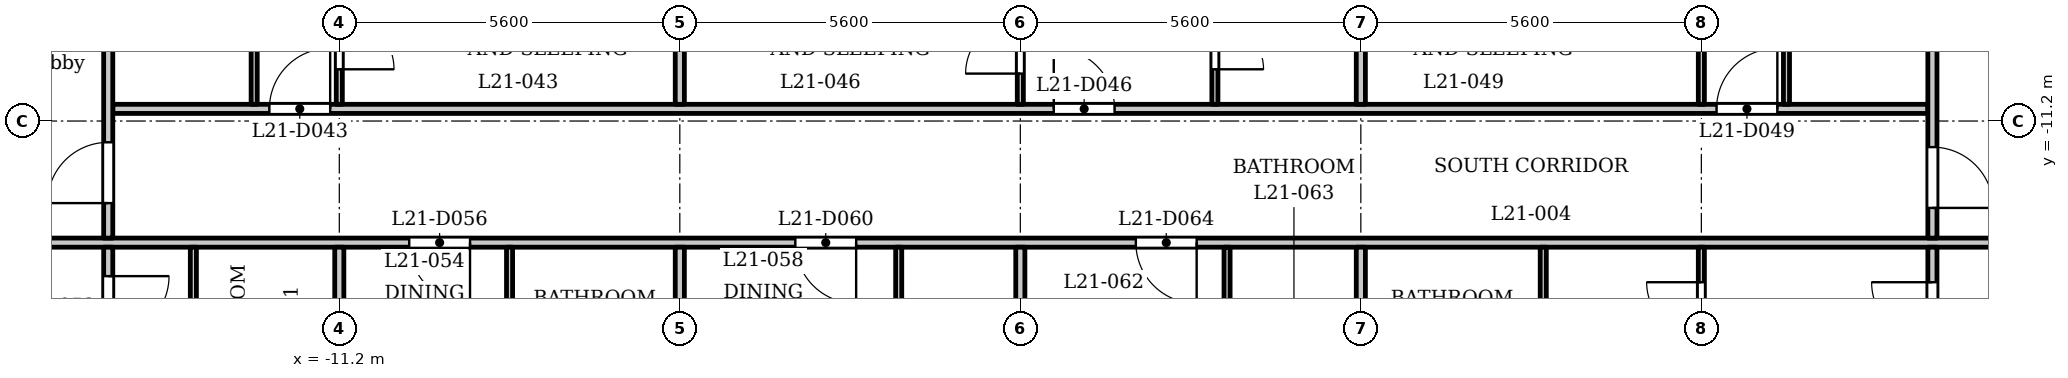
"""IFC4 building model, lengths in metres.
Left out: names, types, materials, properties, quantities, classifications, styles, units other than length and angle.
Written with IfcOpenShell. Run it as: python <this file> out.ifc"""

import sys

from ifc_helpers import new_model, si_unit, direction, frame, frame_2d, origin, place, context, subcontext, project, spatial, rectangle, extrude, element, fill, save


model = new_model("IFC4")
c1 = context("Model", 3, precision=1e-05, world=origin(), true_north=direction((0.0, 1.0)))
c2 = subcontext(c1, "Body", "Model", "MODEL_VIEW")
j1 = project(units=[si_unit("LENGTHUNIT", "METRE"), si_unit("PLANEANGLEUNIT", "RADIAN")], contexts=[c1])
p1 = place(None, origin())
s1 = spatial("IfcSite", under=j1, at=p1, CompositionType="ELEMENT")
p2 = place(p1, origin())
s2 = spatial("IfcBuilding", under=s1, at=p2, CompositionType="ELEMENT")
p3 = place(p2, frame((0.0, 0.0, 86.8)))
s3 = spatial("IfcBuildingStorey", under=s2, at=p3, CompositionType="ELEMENT", Elevation=86.8)
p4 = place(p3, frame((-17.4, -13.2, 0.0), z_axis=(0.0, 0.0, 1.0), x_axis=(1.0, 0.0, 0.0)))
e1 = element("IfcWall", 1, at=p4, inside=s3, PredefinedType="PARTITIONING", context=c2, shape_type="SweptSolid", body=[
    extrude(rectangle(XDim=34.8, YDim=0.15, at=frame_2d((17.4, 0.0))), origin(), (0.0, 0.0, 1.0), 3.2),
])
p5 = place(p4, frame((0.15, 0.0, 0.0)))
e2 = element("IfcOpeningElement", 2, at=p5, cuts=e1, PredefinedType="OPENING", context=c2, shape_type="SweptSolid", body=[
    extrude(rectangle(XDim=1.0, YDim=2.1, at=frame_2d((0.5, 1.05))), frame((0.0, 0.085, 0.0), z_axis=(0.0, -1.0, 0.0), x_axis=(1.0, 0.0, 0.0)), (0.0, 0.0, 1.0), 0.17),
])
p6 = place(p4, frame((33.55, 0.0, 0.0)))
e3 = element("IfcOpeningElement", 3, at=p6, cuts=e1, PredefinedType="OPENING", context=c2, shape_type="SweptSolid", body=[
    extrude(rectangle(XDim=1.0, YDim=2.1, at=frame_2d((0.5, 1.05))), frame((0.0, 0.085, 0.0), z_axis=(0.0, -1.0, 0.0), x_axis=(1.0, 0.0, 0.0)), (0.0, 0.0, 1.0), 0.17),
])
p7 = place(p4, frame((7.35, 0.0, 0.0)))
e4 = element("IfcOpeningElement", 4, at=p7, cuts=e1, PredefinedType="OPENING", context=c2, shape_type="SweptSolid", body=[
    extrude(rectangle(XDim=1.0, YDim=2.1, at=frame_2d((0.5, 1.05))), frame((0.0, 0.085, 0.0), z_axis=(0.0, -1.0, 0.0), x_axis=(1.0, 0.0, 0.0)), (0.0, 0.0, 1.0), 0.17),
])
p8 = place(p4, frame((13.7, 0.0, 0.0)))
e5 = element("IfcOpeningElement", 5, at=p8, cuts=e1, PredefinedType="OPENING", context=c2, shape_type="SweptSolid", body=[
    extrude(rectangle(XDim=1.0, YDim=2.1, at=frame_2d((0.5, 1.05))), frame((0.0, 0.085, 0.0), z_axis=(0.0, -1.0, 0.0), x_axis=(1.0, 0.0, 0.0)), (0.0, 0.0, 1.0), 0.17),
])
p9 = place(p4, frame((19.3, 0.0, 0.0)))
e6 = element("IfcOpeningElement", 6, at=p9, cuts=e1, PredefinedType="OPENING", context=c2, shape_type="SweptSolid", body=[
    extrude(rectangle(XDim=1.0, YDim=2.1, at=frame_2d((0.5, 1.05))), frame((0.0, 0.085, 0.0), z_axis=(0.0, -1.0, 0.0), x_axis=(1.0, 0.0, 0.0)), (0.0, 0.0, 1.0), 0.17),
])
p10 = place(p3, frame((-14.925, -11.0, 0.0), z_axis=(0.0, 0.0, 1.0), x_axis=(1.0, 0.0, 0.0)))
e7 = element("IfcWall", 7, at=p10, inside=s3, PredefinedType="PARTITIONING", context=c2, shape_type="SweptSolid", body=[
    extrude(rectangle(XDim=29.85, YDim=0.15, at=frame_2d((14.925, 0.0))), origin(), (0.0, 0.0, 1.0), 3.2),
])
p11 = place(p10, frame((2.575, 0.0, 0.0)))
e8 = element("IfcOpeningElement", 8, at=p11, cuts=e7, PredefinedType="OPENING", context=c2, shape_type="SweptSolid", body=[
    extrude(rectangle(XDim=1.0, YDim=2.1, at=frame_2d((0.5, 1.05))), frame((0.0, 0.085, 0.0), z_axis=(0.0, -1.0, 0.0), x_axis=(1.0, 0.0, 0.0)), (0.0, 0.0, 1.0), 0.17),
])
p12 = place(p10, frame((15.475, 0.0, 0.0)))
e9 = element("IfcOpeningElement", 9, at=p12, cuts=e7, PredefinedType="OPENING", context=c2, shape_type="SweptSolid", body=[
    extrude(rectangle(XDim=1.0, YDim=2.1, at=frame_2d((0.5, 1.05))), frame((0.0, 0.085, 0.0), z_axis=(0.0, -1.0, 0.0), x_axis=(1.0, 0.0, 0.0)), (0.0, 0.0, 1.0), 0.17),
])
p13 = place(p10, frame((26.375, 0.0, 0.0)))
e10 = element("IfcOpeningElement", 10, at=p13, cuts=e7, PredefinedType="OPENING", context=c2, shape_type="SweptSolid", body=[
    extrude(rectangle(XDim=1.0, YDim=2.1, at=frame_2d((0.5, 1.05))), frame((0.0, 0.085, 0.0), z_axis=(0.0, -1.0, 0.0), x_axis=(1.0, 0.0, 0.0)), (0.0, 0.0, 1.0), 0.17),
])
p14 = place(p3, frame((-15.0, -15.325, 0.0), z_axis=(0.0, 0.0, 1.0), x_axis=(0.0, 1.0, 0.0)))
e11 = element("IfcWall", 11, at=p14, inside=s3, PredefinedType="PARTITIONING", context=c2, shape_type="SweptSolid", body=[
    extrude(rectangle(XDim=2.05, YDim=0.15, at=frame_2d((1.025, 0.0))), origin(), (0.0, 0.0, 1.0), 3.2),
])
p15 = place(p14, frame((0.574, 0.0, 0.0)))
e12 = element("IfcOpeningElement", 12, at=p15, cuts=e11, PredefinedType="OPENING", context=c2, shape_type="SweptSolid", body=[
    extrude(rectangle(XDim=1.0, YDim=2.1, at=frame_2d((0.5, 1.05))), frame((0.0, 0.085, 0.0), z_axis=(0.0, -1.0, 0.0), x_axis=(1.0, 0.0, 0.0)), (0.0, 0.0, 1.0), 0.17),
])
p16 = place(p3, frame((-15.0, -13.125, 0.0), z_axis=(0.0, 0.0, 1.0), x_axis=(0.0, 1.0, 0.0)))
e13 = element("IfcWall", 13, at=p16, inside=s3, PredefinedType="PARTITIONING", context=c2, shape_type="SweptSolid", body=[
    extrude(rectangle(XDim=6.356, YDim=0.15, at=frame_2d((3.178, 0.0))), origin(), (0.0, 0.0, 1.0), 3.2),
])
p17 = place(p16, frame((0.575, 0.0, 0.0)))
e14 = element("IfcOpeningElement", 14, at=p17, cuts=e13, PredefinedType="OPENING", context=c2, shape_type="SweptSolid", body=[
    extrude(rectangle(XDim=1.0, YDim=2.1, at=frame_2d((0.5, 1.05))), frame((0.0, 0.085, 0.0), z_axis=(0.0, -1.0, 0.0), x_axis=(1.0, 0.0, 0.0)), (0.0, 0.0, 1.0), 0.17),
])
p18 = place(p3, frame((-13.6, -16.45, 0.0), z_axis=(0.0, 0.0, 1.0), x_axis=(0.0, 1.0, 0.0)))
e15 = element("IfcWall", 15, at=p18, inside=s3, PredefinedType="PARTITIONING", context=c2, shape_type="SweptSolid", body=[
    extrude(rectangle(XDim=3.175, YDim=0.1, at=frame_2d((1.587, 0.0))), origin(), (0.0, 0.0, 1.0), 3.2),
])
p19 = place(p3, frame((-12.6, -10.925, 0.0), z_axis=(0.0, 0.0, 1.0), x_axis=(0.0, 1.0, 0.0)))
e16 = element("IfcWall", 16, at=p19, inside=s3, PredefinedType="PARTITIONING", context=c2, shape_type="SweptSolid", body=[
    extrude(rectangle(XDim=3.605, YDim=0.1, at=frame_2d((1.802, 0.0))), origin(), (0.0, 0.0, 1.0), 3.2),
])
p20 = place(p19, frame((1.105, 0.0, 0.0)))
e17 = element("IfcOpeningElement", 17, at=p20, cuts=e16, PredefinedType="OPENING", context=c2, shape_type="SweptSolid", body=[
    extrude(rectangle(XDim=0.8, YDim=2.1, at=frame_2d((0.4, 1.05))), frame((0.0, 0.06, 0.0), z_axis=(0.0, -1.0, 0.0), x_axis=(1.0, 0.0, 0.0)), (0.0, 0.0, 1.0), 0.12),
])
p21 = place(p3, frame((-11.2, -10.925, 0.0), z_axis=(0.0, 0.0, 1.0), x_axis=(0.0, 1.0, 0.0)))
e18 = element("IfcWall", 18, at=p21, inside=s3, PredefinedType="PARTITIONING", context=c2, shape_type="SweptSolid", body=[
    extrude(rectangle(XDim=3.605, YDim=0.1, at=frame_2d((1.802, 0.0))), origin(), (0.0, 0.0, 1.0), 3.2),
])
p22 = place(p21, frame((0.576, 0.0, 0.0)))
e19 = element("IfcOpeningElement", 19, at=p22, cuts=e18, PredefinedType="OPENING", context=c2, shape_type="SweptSolid", body=[
    extrude(rectangle(XDim=0.9, YDim=2.1, at=frame_2d((0.45, 1.05))), frame((0.0, 0.06, 0.0), z_axis=(0.0, -1.0, 0.0), x_axis=(1.0, 0.0, 0.0)), (0.0, 0.0, 1.0), 0.12),
])
p23 = place(p3, frame((-11.2, -16.45, 0.0), z_axis=(0.0, 0.0, 1.0), x_axis=(0.0, 1.0, 0.0)))
e20 = element("IfcWall", 20, at=p23, inside=s3, PredefinedType="PARTITIONING", context=c2, shape_type="SweptSolid", body=[
    extrude(rectangle(XDim=3.175, YDim=0.15, at=frame_2d((1.587, 0.0))), origin(), (0.0, 0.0, 1.0), 3.2),
])
p24 = place(p3, frame((-8.4, -16.45, 0.0), z_axis=(0.0, 0.0, 1.0), x_axis=(0.0, 1.0, 0.0)))
e21 = element("IfcWall", 21, at=p24, inside=s3, PredefinedType="PARTITIONING", context=c2, shape_type="SweptSolid", body=[
    extrude(rectangle(XDim=3.175, YDim=0.1, at=frame_2d((1.587, 0.0))), origin(), (0.0, 0.0, 1.0), 3.2),
])
p25 = place(p3, frame((-5.6, -16.45, 0.0), z_axis=(0.0, 0.0, 1.0), x_axis=(0.0, 1.0, 0.0)))
e22 = element("IfcWall", 22, at=p25, inside=s3, PredefinedType="PARTITIONING", context=c2, shape_type="SweptSolid", body=[
    extrude(rectangle(XDim=3.175, YDim=0.15, at=frame_2d((1.587, 0.0))), origin(), (0.0, 0.0, 1.0), 3.2),
])
p26 = place(p3, frame((-5.6, -10.925, 0.0), z_axis=(0.0, 0.0, 1.0), x_axis=(0.0, 1.0, 0.0)))
e23 = element("IfcWall", 23, at=p26, inside=s3, PredefinedType="PARTITIONING", context=c2, shape_type="SweptSolid", body=[
    extrude(rectangle(XDim=3.605, YDim=0.15, at=frame_2d((1.802, 0.0))), origin(), (0.0, 0.0, 1.0), 3.2),
])
p27 = place(p3, frame((-2.0, -16.45, 0.0), z_axis=(0.0, 0.0, 1.0), x_axis=(0.0, 1.0, 0.0)))
e24 = element("IfcWall", 24, at=p27, inside=s3, PredefinedType="PARTITIONING", context=c2, shape_type="SweptSolid", body=[
    extrude(rectangle(XDim=3.175, YDim=0.1, at=frame_2d((1.587, 0.0))), origin(), (0.0, 0.0, 1.0), 3.2),
])
p28 = place(p3, frame((0.0, -10.925, 0.0), z_axis=(0.0, 0.0, 1.0), x_axis=(0.0, 1.0, 0.0)))
e25 = element("IfcWall", 25, at=p28, inside=s3, PredefinedType="PARTITIONING", context=c2, shape_type="SweptSolid", body=[
    extrude(rectangle(XDim=3.605, YDim=0.1, at=frame_2d((1.802, 0.0))), origin(), (0.0, 0.0, 1.0), 3.2),
])
p29 = place(p28, frame((0.505, 0.0, 0.0)))
e26 = element("IfcOpeningElement", 26, at=p29, cuts=e25, PredefinedType="OPENING", context=c2, shape_type="SweptSolid", body=[
    extrude(rectangle(XDim=0.9, YDim=2.1, at=frame_2d((0.45, 1.05))), frame((0.0, 0.06, 0.0), z_axis=(0.0, -1.0, 0.0), x_axis=(1.0, 0.0, 0.0)), (0.0, 0.0, 1.0), 0.12),
])
p30 = place(p3, frame((0.0, -16.45, 0.0), z_axis=(0.0, 0.0, 1.0), x_axis=(0.0, 1.0, 0.0)))
e27 = element("IfcWall", 27, at=p30, inside=s3, PredefinedType="PARTITIONING", context=c2, shape_type="SweptSolid", body=[
    extrude(rectangle(XDim=3.175, YDim=0.15, at=frame_2d((1.587, 0.0))), origin(), (0.0, 0.0, 1.0), 3.2),
])
p31 = place(p3, frame((3.2, -10.925, 0.0), z_axis=(0.0, 0.0, 1.0), x_axis=(0.0, 1.0, 0.0)))
e28 = element("IfcWall", 28, at=p31, inside=s3, PredefinedType="PARTITIONING", context=c2, shape_type="SweptSolid", body=[
    extrude(rectangle(XDim=3.605, YDim=0.1, at=frame_2d((1.802, 0.0))), origin(), (0.0, 0.0, 1.0), 3.2),
])
p32 = place(p31, frame((0.576, 0.0, 0.0)))
e29 = element("IfcOpeningElement", 29, at=p32, cuts=e28, PredefinedType="OPENING", context=c2, shape_type="SweptSolid", body=[
    extrude(rectangle(XDim=0.8, YDim=2.1, at=frame_2d((0.4, 1.05))), frame((0.0, 0.06, 0.0), z_axis=(0.0, -1.0, 0.0), x_axis=(1.0, 0.0, 0.0)), (0.0, 0.0, 1.0), 0.12),
])
p33 = place(p3, frame((3.4, -16.45, 0.0), z_axis=(0.0, 0.0, 1.0), x_axis=(0.0, 1.0, 0.0)))
e30 = element("IfcWall", 30, at=p33, inside=s3, PredefinedType="PARTITIONING", context=c2, shape_type="SweptSolid", body=[
    extrude(rectangle(XDim=3.175, YDim=0.1, at=frame_2d((1.587, 0.0))), origin(), (0.0, 0.0, 1.0), 3.2),
])
p34 = place(p3, frame((5.6, -16.45, 0.0), z_axis=(0.0, 0.0, 1.0), x_axis=(0.0, 1.0, 0.0)))
e31 = element("IfcWall", 31, at=p34, inside=s3, PredefinedType="PARTITIONING", context=c2, shape_type="SweptSolid", body=[
    extrude(rectangle(XDim=3.175, YDim=0.15, at=frame_2d((1.587, 0.0))), origin(), (0.0, 0.0, 1.0), 3.2),
])
p35 = place(p3, frame((5.6, -10.925, 0.0), z_axis=(0.0, 0.0, 1.0), x_axis=(0.0, 1.0, 0.0)))
e32 = element("IfcWall", 32, at=p35, inside=s3, PredefinedType="PARTITIONING", context=c2, shape_type="SweptSolid", body=[
    extrude(rectangle(XDim=3.605, YDim=0.15, at=frame_2d((1.802, 0.0))), origin(), (0.0, 0.0, 1.0), 3.2),
])
p36 = place(p3, frame((8.6, -16.45, 0.0), z_axis=(0.0, 0.0, 1.0), x_axis=(0.0, 1.0, 0.0)))
e33 = element("IfcWall", 33, at=p36, inside=s3, PredefinedType="PARTITIONING", context=c2, shape_type="SweptSolid", body=[
    extrude(rectangle(XDim=3.175, YDim=0.1, at=frame_2d((1.587, 0.0))), origin(), (0.0, 0.0, 1.0), 3.2),
])
p37 = place(p3, frame((11.2, -16.45, 0.0), z_axis=(0.0, 0.0, 1.0), x_axis=(0.0, 1.0, 0.0)))
e34 = element("IfcWall", 34, at=p37, inside=s3, PredefinedType="PARTITIONING", context=c2, shape_type="SweptSolid", body=[
    extrude(rectangle(XDim=3.175, YDim=0.1, at=frame_2d((1.587, 0.0))), origin(), (0.0, 0.0, 1.0), 3.2),
])
p38 = place(p37, frame((1.699, 0.0, 0.0)))
e35 = element("IfcOpeningElement", 35, at=p38, cuts=e34, PredefinedType="OPENING", context=c2, shape_type="SweptSolid", body=[
    extrude(rectangle(XDim=0.9, YDim=2.1, at=frame_2d((0.45, 1.05))), frame((0.0, 0.06, 0.0), z_axis=(0.0, -1.0, 0.0), x_axis=(1.0, 0.0, 0.0)), (0.0, 0.0, 1.0), 0.12),
])
p39 = place(p3, frame((11.2, -10.925, 0.0), z_axis=(0.0, 0.0, 1.0), x_axis=(0.0, 1.0, 0.0)))
e36 = element("IfcWall", 36, at=p39, inside=s3, PredefinedType="PARTITIONING", context=c2, shape_type="SweptSolid", body=[
    extrude(rectangle(XDim=3.605, YDim=0.1, at=frame_2d((1.802, 0.0))), origin(), (0.0, 0.0, 1.0), 3.2),
])
p40 = place(p39, frame((1.005, 0.0, 0.0)))
e37 = element("IfcOpeningElement", 37, at=p40, cuts=e36, PredefinedType="OPENING", context=c2, shape_type="SweptSolid", body=[
    extrude(rectangle(XDim=0.9, YDim=2.1, at=frame_2d((0.45, 1.05))), frame((0.0, 0.06, 0.0), z_axis=(0.0, -1.0, 0.0), x_axis=(1.0, 0.0, 0.0)), (0.0, 0.0, 1.0), 0.12),
])
p41 = place(p3, frame((12.6, -10.925, 0.0), z_axis=(0.0, 0.0, 1.0), x_axis=(0.0, 1.0, 0.0)))
e38 = element("IfcWall", 38, at=p41, inside=s3, PredefinedType="PARTITIONING", context=c2, shape_type="SweptSolid", body=[
    extrude(rectangle(XDim=3.605, YDim=0.1, at=frame_2d((1.802, 0.0))), origin(), (0.0, 0.0, 1.0), 3.2),
])
p42 = place(p41, frame((1.076, 0.0, 0.0)))
e39 = element("IfcOpeningElement", 39, at=p42, cuts=e38, PredefinedType="OPENING", context=c2, shape_type="SweptSolid", body=[
    extrude(rectangle(XDim=0.8, YDim=2.1, at=frame_2d((0.4, 1.05))), frame((0.0, 0.06, 0.0), z_axis=(0.0, -1.0, 0.0), x_axis=(1.0, 0.0, 0.0)), (0.0, 0.0, 1.0), 0.12),
])
p43 = place(p3, frame((15.0, -15.325, 0.0), z_axis=(0.0, 0.0, 1.0), x_axis=(0.0, 1.0, 0.0)))
e40 = element("IfcWall", 40, at=p43, inside=s3, PredefinedType="PARTITIONING", context=c2, shape_type="SweptSolid", body=[
    extrude(rectangle(XDim=2.05, YDim=0.15, at=frame_2d((1.025, 0.0))), origin(), (0.0, 0.0, 1.0), 3.2),
])
p44 = place(p43, frame((0.474, 0.0, 0.0)))
e41 = element("IfcOpeningElement", 41, at=p44, cuts=e40, PredefinedType="OPENING", context=c2, shape_type="SweptSolid", body=[
    extrude(rectangle(XDim=1.0, YDim=2.1, at=frame_2d((0.5, 1.05))), frame((0.0, 0.085, 0.0), z_axis=(0.0, -1.0, 0.0), x_axis=(1.0, 0.0, 0.0)), (0.0, 0.0, 1.0), 0.17),
])
p45 = place(p3, frame((15.0, -13.125, 0.0), z_axis=(0.0, 0.0, 1.0), x_axis=(0.0, 1.0, 0.0)))
e42 = element("IfcWall", 42, at=p45, inside=s3, PredefinedType="PARTITIONING", context=c2, shape_type="SweptSolid", body=[
    extrude(rectangle(XDim=6.356, YDim=0.15, at=frame_2d((3.178, 0.0))), origin(), (0.0, 0.0, 1.0), 3.2),
])
p46 = place(p45, frame((0.496, 0.0, 0.0)))
e43 = element("IfcOpeningElement", 43, at=p46, cuts=e42, PredefinedType="OPENING", context=c2, shape_type="SweptSolid", body=[
    extrude(rectangle(XDim=1.0, YDim=2.1, at=frame_2d((0.5, 1.05))), frame((0.0, 0.085, 0.0), z_axis=(0.0, -1.0, 0.0), x_axis=(1.0, 0.0, 0.0)), (0.0, 0.0, 1.0), 0.17),
])
p47 = place(p17, origin())
e44 = element("IfcDoor", 44, at=p47, inside=s3, OperationType="SINGLE_SWING_RIGHT", PredefinedType="DOOR", context=c2, shape_type="SweptSolid", body=[
    extrude(rectangle(XDim=1.0, YDim=2.1, at=frame_2d((0.5, 1.05))), frame((0.0, 0.025, 0.0), z_axis=(0.0, -1.0, 0.0), x_axis=(1.0, 0.0, 0.0)), (0.0, 0.0, 1.0), 0.05),
])
fill(e14, e44)
p48 = place(p46, origin())
e45 = element("IfcDoor", 45, at=p48, inside=s3, OperationType="SINGLE_SWING_LEFT", PredefinedType="DOOR", context=c2, shape_type="SweptSolid", body=[
    extrude(rectangle(XDim=1.0, YDim=2.1, at=frame_2d((0.5, 1.05))), frame((0.0, 0.025, 0.0), z_axis=(0.0, -1.0, 0.0), x_axis=(1.0, 0.0, 0.0)), (0.0, 0.0, 1.0), 0.05),
])
fill(e43, e45)
p49 = place(p11, origin())
e46 = element("IfcDoor", 46, at=p49, inside=s3, OperationType="SINGLE_SWING_LEFT", PredefinedType="DOOR", context=c2, shape_type="SweptSolid", body=[
    extrude(rectangle(XDim=1.0, YDim=2.1, at=frame_2d((0.5, 1.05))), frame((0.0, 0.025, 0.0), z_axis=(0.0, -1.0, 0.0), x_axis=(1.0, 0.0, 0.0)), (0.0, 0.0, 1.0), 0.05),
])
fill(e8, e46)
p50 = place(p22, origin())
e47 = element("IfcDoor", 47, at=p50, inside=s3, OperationType="SINGLE_SWING_LEFT", PredefinedType="DOOR", context=c2, shape_type="SweptSolid", body=[
    extrude(rectangle(XDim=0.9, YDim=2.1, at=frame_2d((0.45, 1.05))), frame((0.0, 0.025, 0.0), z_axis=(0.0, -1.0, 0.0), x_axis=(1.0, 0.0, 0.0)), (0.0, 0.0, 1.0), 0.05),
])
fill(e19, e47)
p51 = place(p12, origin())
e48 = element("IfcDoor", 48, at=p51, inside=s3, OperationType="SINGLE_SWING_RIGHT", PredefinedType="DOOR", context=c2, shape_type="SweptSolid", body=[
    extrude(rectangle(XDim=1.0, YDim=2.1, at=frame_2d((0.5, 1.05))), frame((0.0, 0.025, 0.0), z_axis=(0.0, -1.0, 0.0), x_axis=(1.0, 0.0, 0.0)), (0.0, 0.0, 1.0), 0.05),
])
fill(e9, e48)
p52 = place(p32, origin())
e49 = element("IfcDoor", 49, at=p52, inside=s3, OperationType="SINGLE_SWING_LEFT", PredefinedType="DOOR", context=c2, shape_type="SweptSolid", body=[
    extrude(rectangle(XDim=0.8, YDim=2.1, at=frame_2d((0.4, 1.05))), frame((0.0, 0.025, 0.0), z_axis=(0.0, -1.0, 0.0), x_axis=(1.0, 0.0, 0.0)), (0.0, 0.0, 1.0), 0.05),
])
fill(e29, e49)
p53 = place(p29, origin())
e50 = element("IfcDoor", 50, at=p53, inside=s3, OperationType="SINGLE_SWING_RIGHT", PredefinedType="DOOR", context=c2, shape_type="SweptSolid", body=[
    extrude(rectangle(XDim=0.9, YDim=2.1, at=frame_2d((0.45, 1.05))), frame((0.0, 0.025, 0.0), z_axis=(0.0, -1.0, 0.0), x_axis=(1.0, 0.0, 0.0)), (0.0, 0.0, 1.0), 0.05),
])
fill(e26, e50)
p54 = place(p13, origin())
e51 = element("IfcDoor", 51, at=p54, inside=s3, OperationType="SINGLE_SWING_LEFT", PredefinedType="DOOR", context=c2, shape_type="SweptSolid", body=[
    extrude(rectangle(XDim=1.0, YDim=2.1, at=frame_2d((0.5, 1.05))), frame((0.0, 0.025, 0.0), z_axis=(0.0, -1.0, 0.0), x_axis=(1.0, 0.0, 0.0)), (0.0, 0.0, 1.0), 0.05),
])
fill(e10, e51)
p55 = place(p15, origin())
e52 = element("IfcDoor", 52, at=p55, inside=s3, OperationType="SINGLE_SWING_RIGHT", PredefinedType="DOOR", context=c2, shape_type="SweptSolid", body=[
    extrude(rectangle(XDim=1.0, YDim=2.1, at=frame_2d((0.5, 1.05))), frame((0.0, 0.025, 0.0), z_axis=(0.0, -1.0, 0.0), x_axis=(1.0, 0.0, 0.0)), (0.0, 0.0, 1.0), 0.05),
])
fill(e12, e52)
p56 = place(p7, origin())
e53 = element("IfcDoor", 53, at=p56, inside=s3, OperationType="SINGLE_SWING_RIGHT", PredefinedType="DOOR", context=c2, shape_type="SweptSolid", body=[
    extrude(rectangle(XDim=1.0, YDim=2.1, at=frame_2d((0.5, 1.05))), frame((0.0, 0.025, 0.0), z_axis=(0.0, -1.0, 0.0), x_axis=(1.0, 0.0, 0.0)), (0.0, 0.0, 1.0), 0.05),
])
fill(e4, e53)
p57 = place(p8, origin())
e54 = element("IfcDoor", 54, at=p57, inside=s3, OperationType="SINGLE_SWING_RIGHT", PredefinedType="DOOR", context=c2, shape_type="SweptSolid", body=[
    extrude(rectangle(XDim=1.0, YDim=2.1, at=frame_2d((0.5, 1.05))), frame((0.0, 0.025, 0.0), z_axis=(0.0, -1.0, 0.0), x_axis=(1.0, 0.0, 0.0)), (0.0, 0.0, 1.0), 0.05),
])
fill(e5, e54)
p58 = place(p9, origin())
e55 = element("IfcDoor", 55, at=p58, inside=s3, OperationType="SINGLE_SWING_RIGHT", PredefinedType="DOOR", context=c2, shape_type="SweptSolid", body=[
    extrude(rectangle(XDim=1.0, YDim=2.1, at=frame_2d((0.5, 1.05))), frame((0.0, 0.025, 0.0), z_axis=(0.0, -1.0, 0.0), x_axis=(1.0, 0.0, 0.0)), (0.0, 0.0, 1.0), 0.05),
])
fill(e6, e55)
p59 = place(p44, origin())
e56 = element("IfcDoor", 56, at=p59, inside=s3, OperationType="SINGLE_SWING_LEFT", PredefinedType="DOOR", context=c2, shape_type="SweptSolid", body=[
    extrude(rectangle(XDim=1.0, YDim=2.1, at=frame_2d((0.5, 1.05))), frame((0.0, 0.025, 0.0), z_axis=(0.0, -1.0, 0.0), x_axis=(1.0, 0.0, 0.0)), (0.0, 0.0, 1.0), 0.05),
])
fill(e41, e56)
p60 = place(p38, origin())
e57 = element("IfcDoor", 57, at=p60, inside=s3, OperationType="SINGLE_SWING_LEFT", PredefinedType="DOOR", context=c2, shape_type="SweptSolid", body=[
    extrude(rectangle(XDim=0.9, YDim=2.1, at=frame_2d((0.45, 1.05))), frame((0.0, 0.025, 0.0), z_axis=(0.0, -1.0, 0.0), x_axis=(1.0, 0.0, 0.0)), (0.0, 0.0, 1.0), 0.05),
])
fill(e35, e57)
save(model, sys.argv[1])
